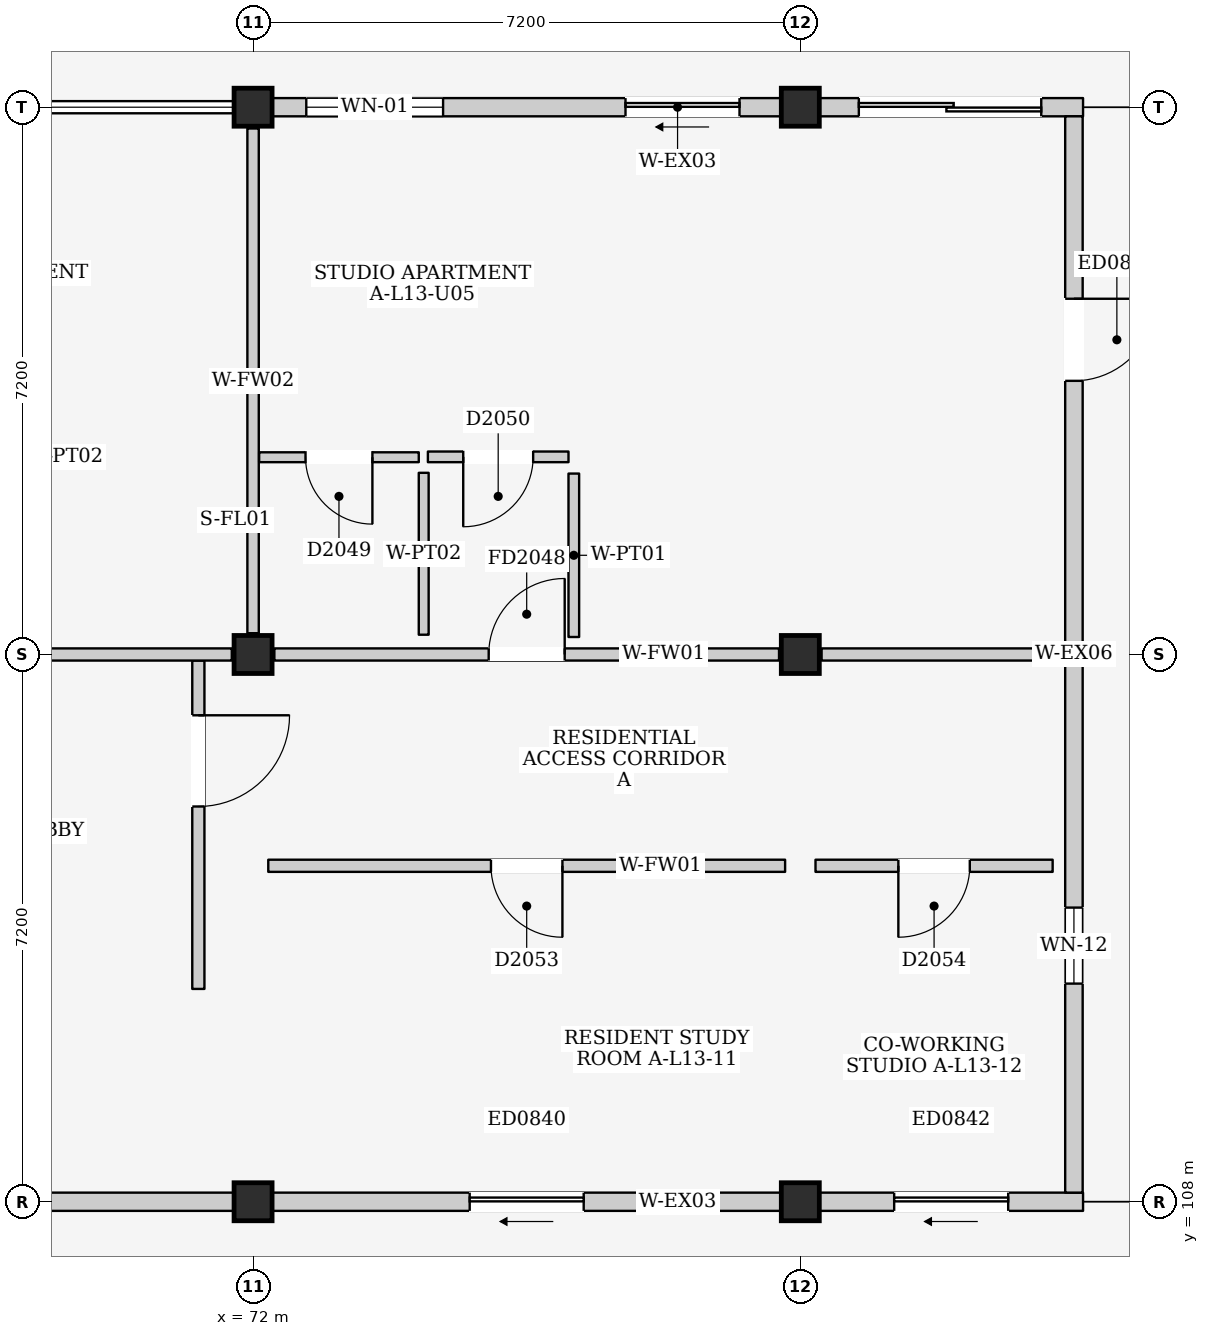
"""IFC4 building model, lengths in metres.
Left out: names, types, materials, properties, quantities, classifications, styles, units other than length and angle.
Written with IfcOpenShell. Run it as: python <this file> out.ifc"""

import sys

from ifc_helpers import new_model, si_unit, direction, frame, frame_2d, origin, origin_2d, place, context, subcontext, project, spatial, rectangle, extrude, element, fill, save


model = new_model("IFC4")
c1 = context("Model", 3, precision=1e-05, world=origin(), true_north=direction((0.0, 1.0)))
c2 = subcontext(c1, "Body", "Model", "MODEL_VIEW")
j1 = project(units=[si_unit("LENGTHUNIT", "METRE"), si_unit("PLANEANGLEUNIT", "RADIAN")], contexts=[c1])
p1 = place(None, origin())
s1 = spatial("IfcSite", under=j1, at=p1, CompositionType="ELEMENT")
p2 = place(p1, origin())
s2 = spatial("IfcBuilding", under=s1, at=p2, CompositionType="ELEMENT")
p3 = place(p2, frame((0.0, 0.0, 44.4)))
s3 = spatial("IfcBuildingStorey", under=s2, at=p3, CompositionType="ELEMENT", Elevation=44.4)
for number, where, z_axis, x_axis in (
    (1, (72.0, 108.0, 0.0), (0.0, 0.0, 1.0), (1.0, 0.0, 0.0)),
    (2, (72.0, 115.2, 0.0), (0.0, 0.0, 1.0), (1.0, 0.0, 0.0)),
    (3, (72.0, 122.4, 0.0), (0.0, 0.0, 1.0), (1.0, 0.0, 0.0)),
    (4, (79.2, 108.0, 0.0), (0.0, 0.0, 1.0), (1.0, 0.0, 0.0)),
    (5, (79.2, 115.2, 0.0), (0.0, 0.0, 1.0), (1.0, 0.0, 0.0)),
    (6, (79.2, 122.4, 0.0), (0.0, 0.0, 1.0), (1.0, 0.0, 0.0)),
):
    element("IfcColumn", number, at=place(p3, frame(where, z_axis=z_axis, x_axis=x_axis)), inside=s3, PredefinedType="COLUMN", context=c2, shape_type="SweptSolid", body=[
        extrude(rectangle(XDim=0.5, YDim=0.5, at=origin_2d()), origin(), (0.0, 0.0, 1.0), 3.3),
    ])
p4 = place(p3, frame((65.05, 108.0, 0.0), z_axis=(0.0, 0.0, 1.0), x_axis=(1.0, 0.0, 0.0)))
e7 = element("IfcWall", 7, at=p4, inside=s3, PredefinedType="ELEMENTEDWALL", context=c2, shape_type="SweptSolid", body=[
    extrude(rectangle(XDim=6.7, YDim=0.24, at=frame_2d((3.35, 0.0))), origin(), (0.0, 0.0, 1.0), 2.415),
])
p5 = place(p4, frame((2.85, 0.0, 1.2)))
e8 = element("IfcOpeningElement", 8, at=p5, cuts=e7, PredefinedType="OPENING", context=c2, shape_type="SweptSolid", body=[
    extrude(rectangle(XDim=1.0, YDim=0.9, at=frame_2d((0.5, 0.45))), frame((0.0, 0.135, 0.0), z_axis=(0.0, -1.0, 0.0), x_axis=(1.0, 0.0, 0.0)), (0.0, 0.0, 1.0), 0.27),
])
p6 = place(p3, frame((72.25, 122.4, 0.0), z_axis=(0.0, 0.0, 1.0), x_axis=(1.0, 0.0, 0.0)))
e9 = element("IfcWall", 9, at=p6, inside=s3, PredefinedType="ELEMENTEDWALL", context=c2, shape_type="SweptSolid", body=[
    extrude(rectangle(XDim=6.7, YDim=0.24, at=frame_2d((3.35, 0.0))), origin(), (0.0, 0.0, 1.0), 2.615),
])
p7 = place(p6, frame((4.65, 0.0, 0.0)))
e10 = element("IfcOpeningElement", 10, at=p7, cuts=e9, PredefinedType="OPENING", context=c2, shape_type="SweptSolid", body=[
    extrude(rectangle(XDim=1.5, YDim=2.12, at=frame_2d((0.75, 1.06))), frame((0.0, 0.135, 0.0), z_axis=(0.0, -1.0, 0.0), x_axis=(1.0, 0.0, 0.0)), (0.0, 0.0, 1.0), 0.27),
])
p8 = place(p6, frame((0.45, 0.0, 0.9)))
e11 = element("IfcOpeningElement", 11, at=p8, cuts=e9, PredefinedType="OPENING", context=c2, shape_type="SweptSolid", body=[
    extrude(rectangle(XDim=1.8, YDim=1.5, at=frame_2d((0.9, 0.75))), frame((0.0, 0.135, 0.0), z_axis=(0.0, -1.0, 0.0), x_axis=(1.0, 0.0, 0.0)), (0.0, 0.0, 1.0), 0.27),
])
p9 = place(p3, frame((72.25, 108.0, 0.0), z_axis=(0.0, 0.0, 1.0), x_axis=(1.0, 0.0, 0.0)))
e12 = element("IfcWall", 12, at=p9, inside=s3, PredefinedType="ELEMENTEDWALL", context=c2, shape_type="SweptSolid", body=[
    extrude(rectangle(XDim=6.7, YDim=0.24, at=frame_2d((3.35, 0.0))), origin(), (0.0, 0.0, 1.0), 2.415),
])
p10 = place(p9, frame((2.6, 0.0, 0.0)))
e13 = element("IfcOpeningElement", 13, at=p10, cuts=e12, PredefinedType="OPENING", context=c2, shape_type="SweptSolid", body=[
    extrude(rectangle(XDim=1.5, YDim=2.12, at=frame_2d((0.75, 1.06))), frame((0.0, 0.135, 0.0), z_axis=(0.0, -1.0, 0.0), x_axis=(1.0, 0.0, 0.0)), (0.0, 0.0, 1.0), 0.27),
])
p11 = place(p3, frame((79.45, 122.4, 0.0), z_axis=(0.0, 0.0, 1.0), x_axis=(1.0, 0.0, 0.0)))
e14 = element("IfcWall", 14, at=p11, inside=s3, PredefinedType="ELEMENTEDWALL", context=c2, shape_type="SweptSolid", body=[
    extrude(rectangle(XDim=3.47, YDim=0.24, at=frame_2d((1.735, 0.0))), origin(), (0.0, 0.0, 1.0), 2.415),
])
p12 = place(p11, frame((0.52, 0.0, 0.0)))
e15 = element("IfcOpeningElement", 15, at=p12, cuts=e14, PredefinedType="OPENING", context=c2, shape_type="SweptSolid", body=[
    extrude(rectangle(XDim=2.4, YDim=2.12, at=frame_2d((1.2, 1.06))), frame((0.0, 0.135, 0.0), z_axis=(0.0, -1.0, 0.0), x_axis=(1.0, 0.0, 0.0)), (0.0, 0.0, 1.0), 0.27),
])
p13 = place(p3, frame((79.45, 108.0, 0.0), z_axis=(0.0, 0.0, 1.0), x_axis=(1.0, 0.0, 0.0)))
e16 = element("IfcWall", 16, at=p13, inside=s3, PredefinedType="ELEMENTEDWALL", context=c2, shape_type="SweptSolid", body=[
    extrude(rectangle(XDim=3.47, YDim=0.24, at=frame_2d((1.735, 0.0))), origin(), (0.0, 0.0, 1.0), 2.415),
])
p14 = place(p13, frame((0.985, 0.0, 0.0)))
e17 = element("IfcOpeningElement", 17, at=p14, cuts=e16, PredefinedType="OPENING", context=c2, shape_type="SweptSolid", body=[
    extrude(rectangle(XDim=1.5, YDim=2.12, at=frame_2d((0.75, 1.06))), frame((0.0, 0.135, 0.0), z_axis=(0.0, -1.0, 0.0), x_axis=(1.0, 0.0, 0.0)), (0.0, 0.0, 1.0), 0.27),
])
p15 = place(p3, frame((82.8, 108.12, 0.0), z_axis=(0.0, 0.0, 1.0), x_axis=(0.0, 1.0, 0.0)))
e18 = element("IfcWall", 18, at=p15, inside=s3, PredefinedType="ELEMENTEDWALL", context=c2, shape_type="SweptSolid", body=[
    extrude(rectangle(XDim=7.08, YDim=0.23, at=frame_2d((3.54, 0.0))), origin(), (0.0, 0.0, 1.0), 2.515),
])
p16 = place(p15, frame((2.75, 0.0, 1.1)))
e19 = element("IfcOpeningElement", 19, at=p16, cuts=e18, PredefinedType="OPENING", context=c2, shape_type="SweptSolid", body=[
    extrude(rectangle(XDim=1.0, YDim=0.9, at=frame_2d((0.5, 0.45))), frame((0.0, 0.13, 0.0), z_axis=(0.0, -1.0, 0.0), x_axis=(1.0, 0.0, 0.0)), (0.0, 0.0, 1.0), 0.26),
])
p17 = place(p3, frame((82.8, 115.2, 0.0), z_axis=(0.0, 0.0, 1.0), x_axis=(0.0, 1.0, 0.0)))
e20 = element("IfcWall", 20, at=p17, inside=s3, PredefinedType="ELEMENTEDWALL", context=c2, shape_type="SweptSolid", body=[
    extrude(rectangle(XDim=7.08, YDim=0.23, at=frame_2d((3.54, 0.0))), origin(), (0.0, 0.0, 1.0), 2.515),
])
p18 = place(p17, frame((3.6, 0.0, 0.0)))
e21 = element("IfcOpeningElement", 21, at=p18, cuts=e20, PredefinedType="OPENING", context=c2, shape_type="SweptSolid", body=[
    extrude(rectangle(XDim=1.08, YDim=2.12, at=frame_2d((0.54, 1.06))), frame((0.0, 0.13, 0.0), z_axis=(0.0, -1.0, 0.0), x_axis=(1.0, 0.0, 0.0)), (0.0, 0.0, 1.0), 0.26),
])
p19 = place(p3, frame((71.28, 110.8, 0.0), z_axis=(0.0, 0.0, 1.0), x_axis=(0.0, 1.0, 0.0)))
e22 = element("IfcWall", 22, at=p19, inside=s3, PredefinedType="PARTITIONING", context=c2, shape_type="SweptSolid", body=[
    extrude(rectangle(XDim=4.32, YDim=0.16, at=frame_2d((2.16, 0.0))), origin(), (0.0, 0.0, 1.0), 3.08),
])
p20 = place(p19, frame((2.4, 0.0, 0.0)))
e23 = element("IfcOpeningElement", 23, at=p20, cuts=e22, PredefinedType="OPENING", context=c2, shape_type="SweptSolid", body=[
    extrude(rectangle(XDim=1.2, YDim=2.2, at=frame_2d((0.6, 1.1))), frame((0.0, 0.095, 0.0), z_axis=(0.0, -1.0, 0.0), x_axis=(1.0, 0.0, 0.0)), (0.0, 0.0, 1.0), 0.19),
])
p21 = place(p3, frame((65.08, 115.2, 0.0), z_axis=(0.0, 0.0, 1.0), x_axis=(1.0, 0.0, 0.0)))
e24 = element("IfcWall", 24, at=p21, inside=s3, PredefinedType="PARTITIONING", context=c2, shape_type="SweptSolid", body=[
    extrude(rectangle(XDim=6.64, YDim=0.16, at=frame_2d((3.32, 0.0))), origin(), (0.0, 0.0, 1.0), 2.415),
])
p22 = place(p21, frame((2.82, 0.0, 0.0)))
e25 = element("IfcOpeningElement", 25, at=p22, cuts=e24, PredefinedType="OPENING", context=c2, shape_type="SweptSolid", body=[
    extrude(rectangle(XDim=1.0, YDim=2.15, at=frame_2d((0.5, 1.075))), frame((0.0, 0.095, 0.0), z_axis=(0.0, -1.0, 0.0), x_axis=(1.0, 0.0, 0.0)), (0.0, 0.0, 1.0), 0.19),
])
p23 = place(p3, frame((72.0, 115.48, 0.0), z_axis=(0.0, 0.0, 1.0), x_axis=(0.0, 1.0, 0.0)))
e26 = element("IfcWall", 26, at=p23, inside=s3, PredefinedType="PARTITIONING", context=c2, shape_type="SweptSolid", body=[
    extrude(rectangle(XDim=6.64, YDim=0.15, at=frame_2d((3.32, 0.0))), origin(), (0.0, 0.0, 1.0), 2.565),
])
p24 = place(p3, frame((72.28, 115.2, 0.0), z_axis=(0.0, 0.0, 1.0), x_axis=(1.0, 0.0, 0.0)))
e27 = element("IfcWall", 27, at=p24, inside=s3, PredefinedType="PARTITIONING", context=c2, shape_type="SweptSolid", body=[
    extrude(rectangle(XDim=6.64, YDim=0.16, at=frame_2d((3.32, 0.0))), origin(), (0.0, 0.0, 1.0), 2.415),
])
p25 = place(p24, frame((2.82, 0.0, 0.0)))
e28 = element("IfcOpeningElement", 28, at=p25, cuts=e27, PredefinedType="OPENING", context=c2, shape_type="SweptSolid", body=[
    extrude(rectangle(XDim=1.0, YDim=2.15, at=frame_2d((0.5, 1.075))), frame((0.0, 0.095, 0.0), z_axis=(0.0, -1.0, 0.0), x_axis=(1.0, 0.0, 0.0)), (0.0, 0.0, 1.0), 0.19),
])
p26 = place(p3, frame((79.48, 115.2, 0.0), z_axis=(0.0, 0.0, 1.0), x_axis=(1.0, 0.0, 0.0)))
e29 = element("IfcWall", 29, at=p26, inside=s3, PredefinedType="PARTITIONING", context=c2, shape_type="SweptSolid", body=[
    extrude(rectangle(XDim=3.04, YDim=0.16, at=frame_2d((1.52, 0.0))), origin(), (0.0, 0.0, 1.0), 2.415),
])
p27 = place(p3, frame((72.08, 117.795, 0.0), z_axis=(0.0, 0.0, 1.0), x_axis=(1.0, 0.0, 0.0)))
e30 = element("IfcWall", 30, at=p27, inside=s3, PredefinedType="PARTITIONING", context=c2, shape_type="SweptSolid", body=[
    extrude(rectangle(XDim=2.1, YDim=0.13, at=frame_2d((1.05, 0.0))), origin(), (0.0, 0.0, 1.0), 3.08),
])
p28 = place(p27, frame((0.61, 0.0, 0.0)))
e31 = element("IfcOpeningElement", 31, at=p28, cuts=e30, PredefinedType="OPENING", context=c2, shape_type="SweptSolid", body=[
    extrude(rectangle(XDim=0.88, YDim=2.1, at=frame_2d((0.44, 1.05))), frame((0.0, 0.08, 0.0), z_axis=(0.0, -1.0, 0.0), x_axis=(1.0, 0.0, 0.0)), (0.0, 0.0, 1.0), 0.16),
])
p29 = place(p3, frame((74.245, 115.46, 0.0), z_axis=(0.0, 0.0, 1.0), x_axis=(0.0, 1.0, 0.0)))
e32 = element("IfcWall", 32, at=p29, inside=s3, PredefinedType="PARTITIONING", context=c2, shape_type="SweptSolid", body=[
    extrude(rectangle(XDim=2.13, YDim=0.13, at=frame_2d((1.065, 0.0))), origin(), (0.0, 0.0, 1.0), 3.08),
])
p30 = place(p3, frame((74.3, 117.8, 0.0), z_axis=(0.0, 0.0, 1.0), x_axis=(1.0, 0.0, 0.0)))
e33 = element("IfcWall", 33, at=p30, inside=s3, PredefinedType="PARTITIONING", context=c2, shape_type="SweptSolid", body=[
    extrude(rectangle(XDim=1.85, YDim=0.14, at=frame_2d((0.925, 0.0))), origin(), (0.0, 0.0, 1.0), 3.08),
])
p31 = place(p30, frame((0.465, 0.0, 0.0)))
e34 = element("IfcOpeningElement", 34, at=p31, cuts=e33, PredefinedType="OPENING", context=c2, shape_type="SweptSolid", body=[
    extrude(rectangle(XDim=0.92, YDim=2.1, at=frame_2d((0.46, 1.05))), frame((0.0, 0.085, 0.0), z_axis=(0.0, -1.0, 0.0), x_axis=(1.0, 0.0, 0.0)), (0.0, 0.0, 1.0), 0.17),
])
p32 = place(p3, frame((76.22, 115.43, 0.0), z_axis=(0.0, 0.0, 1.0), x_axis=(0.0, 1.0, 0.0)))
e35 = element("IfcWall", 35, at=p32, inside=s3, PredefinedType="PARTITIONING", context=c2, shape_type="SweptSolid", body=[
    extrude(rectangle(XDim=2.15, YDim=0.14, at=frame_2d((1.075, 0.0))), origin(), (0.0, 0.0, 1.0), 3.08),
])
p33 = place(p3, frame((72.2, 112.42, 0.0), z_axis=(0.0, 0.0, 1.0), x_axis=(1.0, 0.0, 0.0)))
e36 = element("IfcWall", 36, at=p33, inside=s3, PredefinedType="PARTITIONING", context=c2, shape_type="SweptSolid", body=[
    extrude(rectangle(XDim=6.8, YDim=0.16, at=frame_2d((3.4, 0.0))), origin(), (0.0, 0.0, 1.0), 3.08),
])
p34 = place(p33, frame((2.93, 0.0, 0.0)))
e37 = element("IfcOpeningElement", 37, at=p34, cuts=e36, PredefinedType="OPENING", context=c2, shape_type="SweptSolid", body=[
    extrude(rectangle(XDim=0.94, YDim=2.12, at=frame_2d((0.47, 1.06))), frame((0.0, 0.095, 0.0), z_axis=(0.0, -1.0, 0.0), x_axis=(1.0, 0.0, 0.0)), (0.0, 0.0, 1.0), 0.19),
])
p35 = place(p3, frame((79.4, 112.42, 0.0), z_axis=(0.0, 0.0, 1.0), x_axis=(1.0, 0.0, 0.0)))
e38 = element("IfcWall", 38, at=p35, inside=s3, PredefinedType="PARTITIONING", context=c2, shape_type="SweptSolid", body=[
    extrude(rectangle(XDim=3.12, YDim=0.16, at=frame_2d((1.56, 0.0))), origin(), (0.0, 0.0, 1.0), 3.08),
])
p36 = place(p35, frame((1.09, 0.0, 0.0)))
e39 = element("IfcOpeningElement", 39, at=p36, cuts=e38, PredefinedType="OPENING", context=c2, shape_type="SweptSolid", body=[
    extrude(rectangle(XDim=0.94, YDim=2.12, at=frame_2d((0.47, 1.06))), frame((0.0, 0.095, 0.0), z_axis=(0.0, -1.0, 0.0), x_axis=(1.0, 0.0, 0.0)), (0.0, 0.0, 1.0), 0.19),
])
p37 = place(p7, frame((1.5, 0.0, 0.0), z_axis=(0.0, 0.0, 1.0), x_axis=(-1.0, 0.0, 0.0)))
e40 = element("IfcDoor", 40, at=p37, inside=s3, OperationType="SLIDING_TO_LEFT", PredefinedType="DOOR", context=c2, shape_type="SweptSolid", body=[
    extrude(rectangle(XDim=1.5, YDim=2.12, at=frame_2d((0.75, 1.06))), frame((0.0, 0.025, 0.0), z_axis=(0.0, -1.0, 0.0), x_axis=(1.0, 0.0, 0.0)), (0.0, 0.0, 1.0), 0.05),
])
fill(e10, e40)
p38 = place(p8, origin())
e41 = element("IfcWindow", 41, at=p38, inside=s3, PartitioningType="DOUBLE_PANEL_VERTICAL", PredefinedType="WINDOW", context=c2, shape_type="SweptSolid", body=[
    extrude(rectangle(XDim=1.8, YDim=1.5, at=frame_2d((0.9, 0.75))), frame((0.0, 0.03, 0.0), z_axis=(0.0, -1.0, 0.0), x_axis=(1.0, 0.0, 0.0)), (0.0, 0.0, 1.0), 0.06),
])
fill(e11, e41)
p39 = place(p10, frame((1.5, 0.0, 0.0), z_axis=(0.0, 0.0, 1.0), x_axis=(-1.0, 0.0, 0.0)))
e42 = element("IfcDoor", 42, at=p39, inside=s3, OperationType="SLIDING_TO_LEFT", PredefinedType="DOOR", context=c2, shape_type="SweptSolid", body=[
    extrude(rectangle(XDim=1.5, YDim=2.12, at=frame_2d((0.75, 1.06))), frame((0.0, 0.025, 0.0), z_axis=(0.0, -1.0, 0.0), x_axis=(1.0, 0.0, 0.0)), (0.0, 0.0, 1.0), 0.05),
])
fill(e13, e42)
p40 = place(p12, frame((2.4, 0.0, 0.0), z_axis=(0.0, 0.0, 1.0), x_axis=(-1.0, 0.0, 0.0)))
e43 = element("IfcDoor", 43, at=p40, inside=s3, OperationType="DOUBLE_DOOR_SLIDING", PredefinedType="DOOR", context=c2, shape_type="SweptSolid", body=[
    extrude(rectangle(XDim=2.4, YDim=2.12, at=frame_2d((1.2, 1.06))), frame((0.0, 0.025, 0.0), z_axis=(0.0, -1.0, 0.0), x_axis=(1.0, 0.0, 0.0)), (0.0, 0.0, 1.0), 0.05),
])
fill(e15, e43)
p41 = place(p14, frame((1.5, 0.0, 0.0), z_axis=(0.0, 0.0, 1.0), x_axis=(-1.0, 0.0, 0.0)))
e44 = element("IfcDoor", 44, at=p41, inside=s3, OperationType="SLIDING_TO_LEFT", PredefinedType="DOOR", context=c2, shape_type="SweptSolid", body=[
    extrude(rectangle(XDim=1.5, YDim=2.12, at=frame_2d((0.75, 1.06))), frame((0.0, 0.025, 0.0), z_axis=(0.0, -1.0, 0.0), x_axis=(1.0, 0.0, 0.0)), (0.0, 0.0, 1.0), 0.05),
])
fill(e17, e44)
p42 = place(p16, origin())
e45 = element("IfcWindow", 45, at=p42, inside=s3, PartitioningType="SINGLE_PANEL", PredefinedType="WINDOW", context=c2, shape_type="SweptSolid", body=[
    extrude(rectangle(XDim=1.0, YDim=0.9, at=frame_2d((0.5, 0.45))), frame((0.0, 0.03, 0.0), z_axis=(0.0, -1.0, 0.0), x_axis=(1.0, 0.0, 0.0)), (0.0, 0.0, 1.0), 0.06),
])
fill(e19, e45)
p43 = place(p18, frame((1.08, 0.0, 0.0), z_axis=(0.0, 0.0, 1.0), x_axis=(-1.0, 0.0, 0.0)))
e46 = element("IfcDoor", 46, at=p43, inside=s3, OperationType="SINGLE_SWING_LEFT", PredefinedType="DOOR", context=c2, shape_type="SweptSolid", body=[
    extrude(rectangle(XDim=1.08, YDim=2.12, at=frame_2d((0.54, 1.06))), frame((0.0, 0.025, 0.0), z_axis=(0.0, -1.0, 0.0), x_axis=(1.0, 0.0, 0.0)), (0.0, 0.0, 1.0), 0.05),
])
fill(e21, e46)
p44 = place(p20, frame((1.2, 0.0, 0.0), z_axis=(0.0, 0.0, 1.0), x_axis=(-1.0, 0.0, 0.0)))
e47 = element("IfcDoor", 47, at=p44, inside=s3, OperationType="SINGLE_SWING_LEFT", PredefinedType="DOOR", context=c2, shape_type="SweptSolid", body=[
    extrude(rectangle(XDim=1.2, YDim=2.2, at=frame_2d((0.6, 1.1))), frame((0.0, 0.025, 0.0), z_axis=(0.0, -1.0, 0.0), x_axis=(1.0, 0.0, 0.0)), (0.0, 0.0, 1.0), 0.05),
])
fill(e23, e47)
p45 = place(p25, origin())
e48 = element("IfcDoor", 48, at=p45, inside=s3, OperationType="SINGLE_SWING_RIGHT", PredefinedType="DOOR", context=c2, shape_type="SweptSolid", body=[
    extrude(rectangle(XDim=1.0, YDim=2.15, at=frame_2d((0.5, 1.075))), frame((0.0, 0.025, 0.0), z_axis=(0.0, -1.0, 0.0), x_axis=(1.0, 0.0, 0.0)), (0.0, 0.0, 1.0), 0.05),
])
fill(e28, e48)
p46 = place(p28, frame((0.88, 0.0, 0.0), z_axis=(0.0, 0.0, 1.0), x_axis=(-1.0, 0.0, 0.0)))
e49 = element("IfcDoor", 49, at=p46, inside=s3, OperationType="SINGLE_SWING_LEFT", PredefinedType="DOOR", context=c2, shape_type="SweptSolid", body=[
    extrude(rectangle(XDim=0.88, YDim=2.1, at=frame_2d((0.44, 1.05))), frame((0.0, 0.025, 0.0), z_axis=(0.0, -1.0, 0.0), x_axis=(1.0, 0.0, 0.0)), (0.0, 0.0, 1.0), 0.05),
])
fill(e31, e49)
p47 = place(p31, frame((0.92, 0.0, 0.0), z_axis=(0.0, 0.0, 1.0), x_axis=(-1.0, 0.0, 0.0)))
e50 = element("IfcDoor", 50, at=p47, inside=s3, OperationType="SINGLE_SWING_RIGHT", PredefinedType="DOOR", context=c2, shape_type="SweptSolid", body=[
    extrude(rectangle(XDim=0.92, YDim=2.1, at=frame_2d((0.46, 1.05))), frame((0.0, 0.025, 0.0), z_axis=(0.0, -1.0, 0.0), x_axis=(1.0, 0.0, 0.0)), (0.0, 0.0, 1.0), 0.05),
])
fill(e34, e50)
p48 = place(p34, frame((0.94, 0.0, 0.0), z_axis=(0.0, 0.0, 1.0), x_axis=(-1.0, 0.0, 0.0)))
e51 = element("IfcDoor", 51, at=p48, inside=s3, OperationType="SINGLE_SWING_LEFT", PredefinedType="DOOR", context=c2, shape_type="SweptSolid", body=[
    extrude(rectangle(XDim=0.94, YDim=2.12, at=frame_2d((0.47, 1.06))), frame((0.0, 0.025, 0.0), z_axis=(0.0, -1.0, 0.0), x_axis=(1.0, 0.0, 0.0)), (0.0, 0.0, 1.0), 0.05),
])
fill(e37, e51)
p49 = place(p36, frame((0.94, 0.0, 0.0), z_axis=(0.0, 0.0, 1.0), x_axis=(-1.0, 0.0, 0.0)))
e52 = element("IfcDoor", 52, at=p49, inside=s3, OperationType="SINGLE_SWING_RIGHT", PredefinedType="DOOR", context=c2, shape_type="SweptSolid", body=[
    extrude(rectangle(XDim=0.94, YDim=2.12, at=frame_2d((0.47, 1.06))), frame((0.0, 0.025, 0.0), z_axis=(0.0, -1.0, 0.0), x_axis=(1.0, 0.0, 0.0)), (0.0, 0.0, 1.0), 0.05),
])
fill(e39, e52)
save(model, sys.argv[1])
